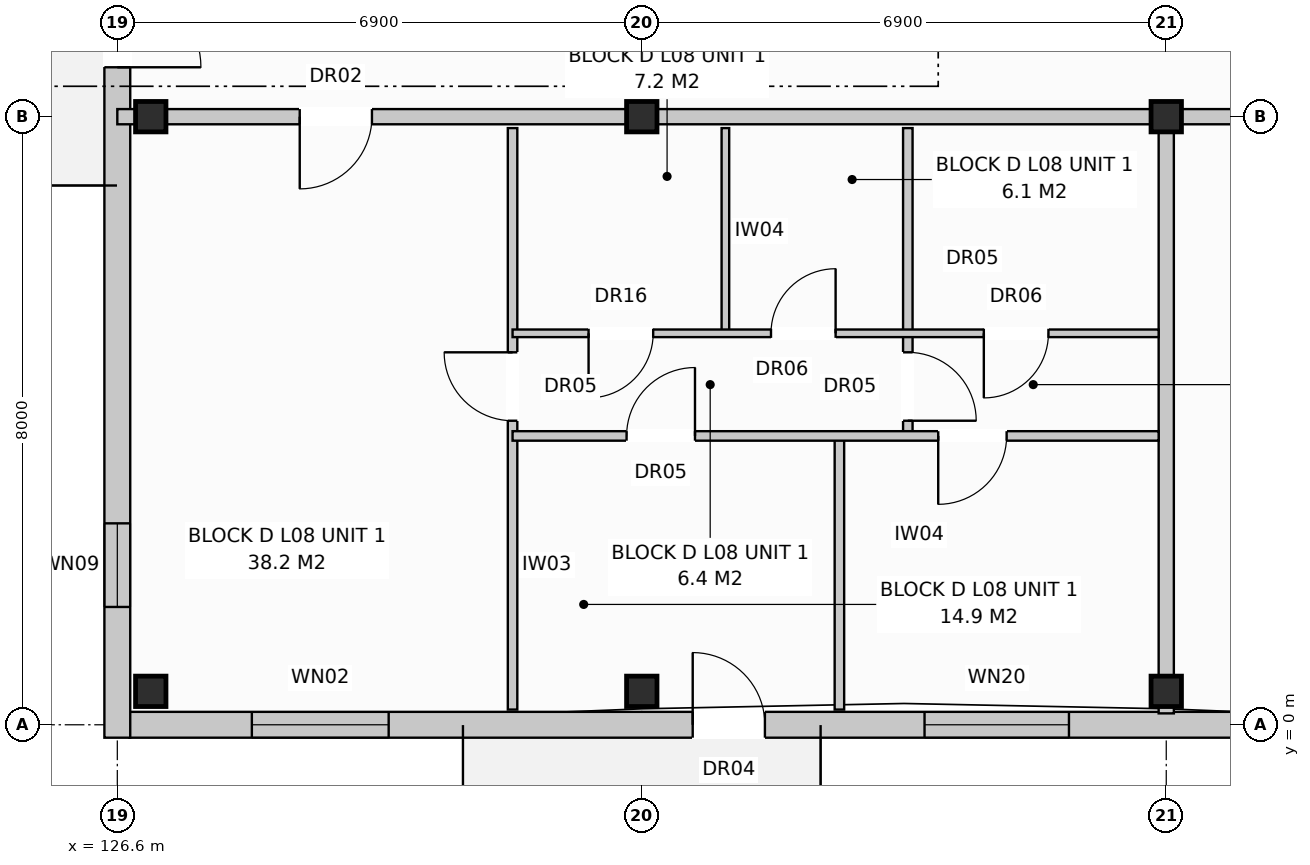
"""IFC4 building model, lengths in metres.
Left out: names, types, materials, properties, quantities, classifications, styles, units other than length and angle.
Written with IfcOpenShell. Run it as: python <this file> out.ifc"""

import sys

from ifc_helpers import new_model, si_unit, direction, frame, frame_2d, origin, origin_with_axes, origin_2d, place, context, subcontext, project, spatial, rectangle, extrude, element, fill, save


model = new_model("IFC4")
c1 = context("Model", 3, precision=1e-05, world=origin(), true_north=direction((0.0, 1.0)))
c2 = subcontext(c1, "Body", "Model", "MODEL_VIEW")
j1 = project(units=[si_unit("LENGTHUNIT", "METRE"), si_unit("PLANEANGLEUNIT", "RADIAN")], contexts=[c1])
p1 = place(None, origin())
s1 = spatial("IfcSite", under=j1, at=p1, CompositionType="ELEMENT")
p2 = place(p1, origin())
s2 = spatial("IfcBuilding", under=s1, at=p2, CompositionType="ELEMENT")
p3 = place(p2, frame((0.0, 0.0, 27.2)))
s3 = spatial("IfcBuildingStorey", under=s2, at=p3, CompositionType="ELEMENT", Elevation=27.2)
for number, where, z_axis, x_axis in (
    (1, (127.04, 0.44, 0.0), (0.0, 0.0, 1.0), (1.0, 0.0, 0.0)),
    (2, (127.04, 8.0, 0.0), (0.0, 0.0, 1.0), (1.0, 0.0, 0.0)),
    (3, (133.5, 0.44, 0.0), (0.0, 0.0, 1.0), (1.0, 0.0, 0.0)),
    (4, (133.5, 8.0, 0.0), (0.0, 0.0, 1.0), (1.0, 0.0, 0.0)),
    (5, (140.4, 0.44, 0.0), (0.0, 0.0, 1.0), (1.0, 0.0, 0.0)),
    (6, (140.4, 8.0, 0.0), (0.0, 0.0, 1.0), (1.0, 0.0, 0.0)),
):
    element("IfcColumn", number, at=place(p3, frame(where, z_axis=z_axis, x_axis=x_axis)), inside=s3, PredefinedType="COLUMN", context=c2, shape_type="SweptSolid", body=[
        extrude(rectangle(XDim=0.4, YDim=0.4, at=origin_2d()), origin(), (0.0, 0.0, 1.0), 3.2),
    ])
p4 = place(p3, frame((126.76, 0.0, 0.0), z_axis=(0.0, 0.0, 1.0), x_axis=(1.0, 0.0, 0.0)))
e7 = element("IfcWall", 7, at=p4, inside=s3, PredefinedType="STANDARD", context=c2, shape_type="SweptSolid", body=[
    extrude(rectangle(XDim=41.08, YDim=0.34, at=frame_2d((20.54, 0.0))), origin(), (0.0, 0.0, 1.0), 2.91),
])
p5 = place(p4, frame((7.41, 0.0, 0.0)))
e8 = element("IfcOpeningElement", 8, at=p5, cuts=e7, PredefinedType="OPENING", context=c2, shape_type="SweptSolid", body=[
    extrude(rectangle(XDim=0.95, YDim=2.1, at=frame_2d((0.475, 1.05))), frame((0.0, 0.182, 0.0), z_axis=(0.0, -1.0, 0.0), x_axis=(1.0, 0.0, 0.0)), (0.0, 0.0, 1.0), 0.364),
])
p6 = place(p4, frame((18.707, 0.0, 0.0)))
e9 = element("IfcOpeningElement", 9, at=p6, cuts=e7, PredefinedType="OPENING", context=c2, shape_type="SweptSolid", body=[
    extrude(rectangle(XDim=0.95, YDim=2.1, at=frame_2d((0.475, 1.05))), frame((0.0, 0.182, 0.0), z_axis=(0.0, -1.0, 0.0), x_axis=(1.0, 0.0, 0.0)), (0.0, 0.0, 1.0), 0.364),
])
p7 = place(p4, frame((32.707, 0.0, 0.0)))
e10 = element("IfcOpeningElement", 10, at=p7, cuts=e7, PredefinedType="OPENING", context=c2, shape_type="SweptSolid", body=[
    extrude(rectangle(XDim=0.95, YDim=2.1, at=frame_2d((0.475, 1.05))), frame((0.0, 0.182, 0.0), z_axis=(0.0, -1.0, 0.0), x_axis=(1.0, 0.0, 0.0)), (0.0, 0.0, 1.0), 0.364),
])
p8 = place(p4, frame((1.61, 0.0, 0.8)))
e11 = element("IfcOpeningElement", 11, at=p8, cuts=e7, PredefinedType="OPENING", context=c2, shape_type="SweptSolid", body=[
    extrude(rectangle(XDim=1.8, YDim=1.7, at=frame_2d((0.9, 0.85))), frame((0.0, 0.182, 0.0), z_axis=(0.0, -1.0, 0.0), x_axis=(1.0, 0.0, 0.0)), (0.0, 0.0, 1.0), 0.364),
])
p9 = place(p4, frame((10.46, 0.0, 0.8)))
e12 = element("IfcOpeningElement", 12, at=p9, cuts=e7, PredefinedType="OPENING", context=c2, shape_type="SweptSolid", body=[
    extrude(rectangle(XDim=1.9, YDim=1.85, at=frame_2d((0.95, 0.925))), frame((0.0, 0.182, 0.0), z_axis=(0.0, -1.0, 0.0), x_axis=(1.0, 0.0, 0.0)), (0.0, 0.0, 1.0), 0.364),
])
p10 = place(p4, frame((15.835, 0.0, 0.8)))
e13 = element("IfcOpeningElement", 13, at=p10, cuts=e7, PredefinedType="OPENING", context=c2, shape_type="SweptSolid", body=[
    extrude(rectangle(XDim=1.95, YDim=1.65, at=frame_2d((0.975, 0.825))), frame((0.0, 0.182, 0.0), z_axis=(0.0, -1.0, 0.0), x_axis=(1.0, 0.0, 0.0)), (0.0, 0.0, 1.0), 0.364),
])
p11 = place(p4, frame((21.96, 0.0, 0.72)))
e14 = element("IfcOpeningElement", 14, at=p11, cuts=e7, PredefinedType="OPENING", context=c2, shape_type="SweptSolid", body=[
    extrude(rectangle(XDim=1.1, YDim=1.5, at=frame_2d((0.55, 0.75))), frame((0.0, 0.182, 0.0), z_axis=(0.0, -1.0, 0.0), x_axis=(1.0, 0.0, 0.0)), (0.0, 0.0, 1.0), 0.364),
])
p12 = place(p4, frame((27.96, 0.0, 0.8)))
e15 = element("IfcOpeningElement", 15, at=p12, cuts=e7, PredefinedType="OPENING", context=c2, shape_type="SweptSolid", body=[
    extrude(rectangle(XDim=1.9, YDim=1.85, at=frame_2d((0.95, 0.925))), frame((0.0, 0.182, 0.0), z_axis=(0.0, -1.0, 0.0), x_axis=(1.0, 0.0, 0.0)), (0.0, 0.0, 1.0), 0.364),
])
p13 = place(p4, frame((30.81, 0.0, 0.85)))
e16 = element("IfcOpeningElement", 16, at=p13, cuts=e7, PredefinedType="OPENING", context=c2, shape_type="SweptSolid", body=[
    extrude(rectangle(XDim=1.5, YDim=1.65, at=frame_2d((0.75, 0.825))), frame((0.0, 0.182, 0.0), z_axis=(0.0, -1.0, 0.0), x_axis=(1.0, 0.0, 0.0)), (0.0, 0.0, 1.0), 0.364),
])
p14 = place(p4, frame((35.76, 0.0, 0.72)))
e17 = element("IfcOpeningElement", 17, at=p14, cuts=e7, PredefinedType="OPENING", context=c2, shape_type="SweptSolid", body=[
    extrude(rectangle(XDim=1.1, YDim=1.5, at=frame_2d((0.55, 0.75))), frame((0.0, 0.182, 0.0), z_axis=(0.0, -1.0, 0.0), x_axis=(1.0, 0.0, 0.0)), (0.0, 0.0, 1.0), 0.364),
])
p15 = place(p4, frame((38.575, 0.0, 0.8)))
e18 = element("IfcOpeningElement", 18, at=p15, cuts=e7, PredefinedType="OPENING", context=c2, shape_type="SweptSolid", body=[
    extrude(rectangle(XDim=1.9, YDim=1.85, at=frame_2d((0.95, 0.925))), frame((0.0, 0.182, 0.0), z_axis=(0.0, -1.0, 0.0), x_axis=(1.0, 0.0, 0.0)), (0.0, 0.0, 1.0), 0.364),
])
p16 = place(p3, frame((126.6, -0.17, 0.0), z_axis=(0.0, 0.0, 1.0), x_axis=(0.0, 1.0, 0.0)))
e19 = element("IfcWall", 19, at=p16, inside=s3, PredefinedType="STANDARD", context=c2, shape_type="SweptSolid", body=[
    extrude(rectangle(XDim=18.74, YDim=0.34, at=frame_2d((9.37, 0.0))), origin(), (0.0, 0.0, 1.0), 2.91),
])
p17 = place(p16, frame((8.82, 0.0, 0.0)))
e20 = element("IfcOpeningElement", 20, at=p17, cuts=e19, PredefinedType="OPENING", context=c2, shape_type="SweptSolid", body=[
    extrude(rectangle(XDim=1.1, YDim=2.1, at=frame_2d((0.55, 1.05))), frame((0.0, 0.182, 0.0), z_axis=(0.0, -1.0, 0.0), x_axis=(1.0, 0.0, 0.0)), (0.0, 0.0, 1.0), 0.364),
])
p18 = place(p16, frame((1.72, 0.0, 0.72)))
e21 = element("IfcOpeningElement", 21, at=p18, cuts=e19, PredefinedType="OPENING", context=c2, shape_type="SweptSolid", body=[
    extrude(rectangle(XDim=1.1, YDim=1.5, at=frame_2d((0.55, 0.75))), frame((0.0, 0.182, 0.0), z_axis=(0.0, -1.0, 0.0), x_axis=(1.0, 0.0, 0.0)), (0.0, 0.0, 1.0), 0.364),
])
p19 = place(p3, frame((140.4, 7.85, 0.0), z_axis=(0.0, 0.0, 1.0), x_axis=(0.0, -1.0, 0.0)))
e22 = element("IfcWall", 22, at=p19, inside=s3, PredefinedType="PARTITIONING", context=c2, shape_type="SweptSolid", body=[
    extrude(rectangle(XDim=7.7, YDim=0.2, at=frame_2d((3.85, 0.0))), origin(), (0.0, 0.0, 1.0), 2.96),
])
p20 = place(p3, frame((126.6, 8.0, 0.0), z_axis=(0.0, 0.0, 1.0), x_axis=(1.0, 0.0, 0.0)))
e23 = element("IfcWall", 23, at=p20, inside=s3, PredefinedType="PARTITIONING", context=c2, shape_type="SweptSolid", body=[
    extrude(rectangle(XDim=13.8, YDim=0.2, at=frame_2d((6.9, 0.0))), origin(), (0.0, 0.0, 1.0), 2.35),
])
p21 = place(p20, frame((2.4, 0.0, 0.0)))
e24 = element("IfcOpeningElement", 24, at=p21, cuts=e23, PredefinedType="OPENING", context=c2, shape_type="SweptSolid", body=[
    extrude(rectangle(XDim=0.95, YDim=2.15, at=frame_2d((0.475, 1.075))), frame((0.0, 0.112, 0.0), z_axis=(0.0, -1.0, 0.0), x_axis=(1.0, 0.0, 0.0)), (0.0, 0.0, 1.0), 0.224),
])
p22 = place(p3, frame((131.8, 7.85, 0.0), z_axis=(0.0, 0.0, 1.0), x_axis=(0.0, -1.0, 0.0)))
e25 = element("IfcWall", 25, at=p22, inside=s3, PredefinedType="PARTITIONING", context=c2, shape_type="SweptSolid", body=[
    extrude(rectangle(XDim=7.65, YDim=0.125, at=frame_2d((3.825, 0.0))), origin(), (0.0, 0.0, 1.0), 2.96),
])
p23 = place(p22, frame((2.95, 0.0, 0.0)))
e26 = element("IfcOpeningElement", 26, at=p23, cuts=e25, PredefinedType="OPENING", context=c2, shape_type="SweptSolid", body=[
    extrude(rectangle(XDim=0.9, YDim=2.1, at=frame_2d((0.45, 1.05))), frame((0.0, 0.074, 0.0), z_axis=(0.0, -1.0, 0.0), x_axis=(1.0, 0.0, 0.0)), (0.0, 0.0, 1.0), 0.149),
])
p24 = place(p3, frame((134.6, 7.85, 0.0), z_axis=(0.0, 0.0, 1.0), x_axis=(0.0, -1.0, 0.0)))
e27 = element("IfcWall", 27, at=p24, inside=s3, PredefinedType="PARTITIONING", context=c2, shape_type="SweptSolid", body=[
    extrude(rectangle(XDim=2.7, YDim=0.1, at=frame_2d((1.35, 0.0))), origin(), (0.0, 0.0, 1.0), 2.59),
])
p25 = place(p3, frame((137.0, 7.85, 0.0), z_axis=(0.0, 0.0, 1.0), x_axis=(0.0, -1.0, 0.0)))
e28 = element("IfcWall", 28, at=p25, inside=s3, PredefinedType="PARTITIONING", context=c2, shape_type="SweptSolid", body=[
    extrude(rectangle(XDim=4.05, YDim=0.125, at=frame_2d((2.025, 0.0))), origin(), (0.0, 0.0, 1.0), 2.96),
])
p26 = place(p25, frame((2.95, 0.0, 0.0)))
e29 = element("IfcOpeningElement", 29, at=p26, cuts=e28, PredefinedType="OPENING", context=c2, shape_type="SweptSolid", body=[
    extrude(rectangle(XDim=0.9, YDim=2.1, at=frame_2d((0.45, 1.05))), frame((0.0, 0.074, 0.0), z_axis=(0.0, -1.0, 0.0), x_axis=(1.0, 0.0, 0.0)), (0.0, 0.0, 1.0), 0.149),
])
p27 = place(p3, frame((136.1, 3.8, 0.0), z_axis=(0.0, 0.0, 1.0), x_axis=(0.0, -1.0, 0.0)))
e30 = element("IfcWall", 30, at=p27, inside=s3, PredefinedType="PARTITIONING", context=c2, shape_type="SweptSolid", body=[
    extrude(rectangle(XDim=3.6, YDim=0.125, at=frame_2d((1.8, 0.0))), origin(), (0.0, 0.0, 1.0), 2.96),
])
p28 = place(p3, frame((131.8, 5.15, 0.0), z_axis=(0.0, 0.0, 1.0), x_axis=(1.0, 0.0, 0.0)))
e31 = element("IfcWall", 31, at=p28, inside=s3, PredefinedType="PARTITIONING", context=c2, shape_type="SweptSolid", body=[
    extrude(rectangle(XDim=8.5, YDim=0.1, at=frame_2d((4.25, 0.0))), origin(), (0.0, 0.0, 1.0), 2.96),
])
p29 = place(p28, frame((1.0, 0.0, 0.0)))
e32 = element("IfcOpeningElement", 32, at=p29, cuts=e31, PredefinedType="OPENING", context=c2, shape_type="SweptSolid", body=[
    extrude(rectangle(XDim=0.85, YDim=2.1, at=frame_2d((0.425, 1.05))), frame((0.0, 0.062, 0.0), z_axis=(0.0, -1.0, 0.0), x_axis=(1.0, 0.0, 0.0)), (0.0, 0.0, 1.0), 0.124),
])
p30 = place(p28, frame((3.4, 0.0, 0.0)))
e33 = element("IfcOpeningElement", 33, at=p30, cuts=e31, PredefinedType="OPENING", context=c2, shape_type="SweptSolid", body=[
    extrude(rectangle(XDim=0.85, YDim=2.05, at=frame_2d((0.425, 1.025))), frame((0.0, 0.062, 0.0), z_axis=(0.0, -1.0, 0.0), x_axis=(1.0, 0.0, 0.0)), (0.0, 0.0, 1.0), 0.124),
])
p31 = place(p28, frame((6.2, 0.0, 0.0)))
e34 = element("IfcOpeningElement", 34, at=p31, cuts=e31, PredefinedType="OPENING", context=c2, shape_type="SweptSolid", body=[
    extrude(rectangle(XDim=0.85, YDim=2.05, at=frame_2d((0.425, 1.025))), frame((0.0, 0.062, 0.0), z_axis=(0.0, -1.0, 0.0), x_axis=(1.0, 0.0, 0.0)), (0.0, 0.0, 1.0), 0.124),
])
p32 = place(p3, frame((131.8, 3.8, 0.0), z_axis=(0.0, 0.0, 1.0), x_axis=(1.0, 0.0, 0.0)))
e35 = element("IfcWall", 35, at=p32, inside=s3, PredefinedType="PARTITIONING", context=c2, shape_type="SweptSolid", body=[
    extrude(rectangle(XDim=8.5, YDim=0.125, at=frame_2d((4.25, 0.0))), origin(), (0.0, 0.0, 1.0), 2.96),
])
p33 = place(p32, frame((1.5, 0.0, 0.0)))
e36 = element("IfcOpeningElement", 36, at=p33, cuts=e35, PredefinedType="OPENING", context=c2, shape_type="SweptSolid", body=[
    extrude(rectangle(XDim=0.9, YDim=2.1, at=frame_2d((0.45, 1.05))), frame((0.0, 0.074, 0.0), z_axis=(0.0, -1.0, 0.0), x_axis=(1.0, 0.0, 0.0)), (0.0, 0.0, 1.0), 0.149),
])
p34 = place(p32, frame((5.6, 0.0, 0.0)))
e37 = element("IfcOpeningElement", 37, at=p34, cuts=e35, PredefinedType="OPENING", context=c2, shape_type="SweptSolid", body=[
    extrude(rectangle(XDim=0.9, YDim=2.1, at=frame_2d((0.45, 1.05))), frame((0.0, 0.074, 0.0), z_axis=(0.0, -1.0, 0.0), x_axis=(1.0, 0.0, 0.0)), (0.0, 0.0, 1.0), 0.149),
])
p35 = place(p3, frame((140.4, 8.0, 0.0), z_axis=(0.0, 0.0, 1.0), x_axis=(1.0, 0.0, 0.0)))
e38 = element("IfcWall", 38, at=p35, inside=s3, PredefinedType="PARTITIONING", context=c2, shape_type="SweptSolid", body=[
    extrude(rectangle(XDim=20.7, YDim=0.2, at=frame_2d((10.35, 0.0))), origin(), (0.0, 0.0, 1.0), 2.35),
])
p36 = place(p35, frame((2.4, 0.0, 0.0)))
e39 = element("IfcOpeningElement", 39, at=p36, cuts=e38, PredefinedType="OPENING", context=c2, shape_type="SweptSolid", body=[
    extrude(rectangle(XDim=0.95, YDim=2.15, at=frame_2d((0.475, 1.075))), frame((0.0, 0.112, 0.0), z_axis=(0.0, -1.0, 0.0), x_axis=(1.0, 0.0, 0.0)), (0.0, 0.0, 1.0), 0.224),
])
p37 = place(p5, origin_with_axes())
e40 = element("IfcDoor", 40, at=p37, inside=s3, OperationType="SINGLE_SWING_LEFT", PredefinedType="DOOR", context=c2, shape_type="SweptSolid", body=[
    extrude(rectangle(XDim=0.95, YDim=2.1, at=frame_2d((0.475, 1.05))), frame((0.0, 0.025, 0.0), z_axis=(0.0, -1.0, 0.0), x_axis=(1.0, 0.0, 0.0)), (0.0, 0.0, 1.0), 0.05),
])
fill(e8, e40)
p38 = place(p8, origin_with_axes())
e41 = element("IfcWindow", 41, at=p38, inside=s3, PartitioningType="SINGLE_PANEL", PredefinedType="WINDOW", context=c2, shape_type="SweptSolid", body=[
    extrude(rectangle(XDim=1.8, YDim=1.7, at=frame_2d((0.9, 0.85))), frame((0.0, 0.03, 0.0), z_axis=(0.0, -1.0, 0.0), x_axis=(1.0, 0.0, 0.0)), (0.0, 0.0, 1.0), 0.06),
])
fill(e11, e41)
p39 = place(p9, origin_with_axes())
e42 = element("IfcWindow", 42, at=p39, inside=s3, PartitioningType="SINGLE_PANEL", PredefinedType="WINDOW", context=c2, shape_type="SweptSolid", body=[
    extrude(rectangle(XDim=1.9, YDim=1.85, at=frame_2d((0.95, 0.925))), frame((0.0, 0.03, 0.0), z_axis=(0.0, -1.0, 0.0), x_axis=(1.0, 0.0, 0.0)), (0.0, 0.0, 1.0), 0.06),
])
fill(e12, e42)
p40 = place(p17, frame((1.1, 0.0, 0.0), z_axis=(0.0, 0.0, 1.0), x_axis=(-1.0, 0.0, 0.0)))
e43 = element("IfcDoor", 43, at=p40, inside=s3, OperationType="SINGLE_SWING_LEFT", PredefinedType="DOOR", context=c2, shape_type="SweptSolid", body=[
    extrude(rectangle(XDim=1.1, YDim=2.1, at=frame_2d((0.55, 1.05))), frame((0.0, 0.025, 0.0), z_axis=(0.0, -1.0, 0.0), x_axis=(1.0, 0.0, 0.0)), (0.0, 0.0, 1.0), 0.05),
])
fill(e20, e43)
p41 = place(p18, origin_with_axes())
e44 = element("IfcWindow", 44, at=p41, inside=s3, PartitioningType="SINGLE_PANEL", PredefinedType="WINDOW", context=c2, shape_type="SweptSolid", body=[
    extrude(rectangle(XDim=1.1, YDim=1.5, at=frame_2d((0.55, 0.75))), frame((0.0, 0.03, 0.0), z_axis=(0.0, -1.0, 0.0), x_axis=(1.0, 0.0, 0.0)), (0.0, 0.0, 1.0), 0.06),
])
fill(e21, e44)
p42 = place(p21, frame((0.95, 0.0, 0.0), z_axis=(0.0, 0.0, 1.0), x_axis=(-1.0, 0.0, 0.0)))
e45 = element("IfcDoor", 45, at=p42, inside=s3, OperationType="SINGLE_SWING_LEFT", PredefinedType="DOOR", context=c2, shape_type="SweptSolid", body=[
    extrude(rectangle(XDim=0.95, YDim=2.15, at=frame_2d((0.475, 1.075))), frame((0.0, 0.025, 0.0), z_axis=(0.0, -1.0, 0.0), x_axis=(1.0, 0.0, 0.0)), (0.0, 0.0, 1.0), 0.05),
])
fill(e24, e45)
p43 = place(p23, frame((0.9, 0.0, 0.0), z_axis=(0.0, 0.0, 1.0), x_axis=(-1.0, 0.0, 0.0)))
e46 = element("IfcDoor", 46, at=p43, inside=s3, OperationType="SINGLE_SWING_LEFT", PredefinedType="DOOR", context=c2, shape_type="SweptSolid", body=[
    extrude(rectangle(XDim=0.9, YDim=2.1, at=frame_2d((0.45, 1.05))), frame((0.0, 0.025, 0.0), z_axis=(0.0, -1.0, 0.0), x_axis=(1.0, 0.0, 0.0)), (0.0, 0.0, 1.0), 0.05),
])
fill(e26, e46)
p44 = place(p26, origin_with_axes())
e47 = element("IfcDoor", 47, at=p44, inside=s3, OperationType="SINGLE_SWING_RIGHT", PredefinedType="DOOR", context=c2, shape_type="SweptSolid", body=[
    extrude(rectangle(XDim=0.9, YDim=2.1, at=frame_2d((0.45, 1.05))), frame((0.0, 0.025, 0.0), z_axis=(0.0, -1.0, 0.0), x_axis=(1.0, 0.0, 0.0)), (0.0, 0.0, 1.0), 0.05),
])
fill(e29, e47)
p45 = place(p29, frame((0.85, 0.0, 0.0), z_axis=(0.0, 0.0, 1.0), x_axis=(-1.0, 0.0, 0.0)))
e48 = element("IfcDoor", 48, at=p45, inside=s3, OperationType="SINGLE_SWING_LEFT", PredefinedType="DOOR", context=c2, shape_type="SweptSolid", body=[
    extrude(rectangle(XDim=0.85, YDim=2.1, at=frame_2d((0.425, 1.05))), frame((0.0, 0.025, 0.0), z_axis=(0.0, -1.0, 0.0), x_axis=(1.0, 0.0, 0.0)), (0.0, 0.0, 1.0), 0.05),
])
fill(e32, e48)
p46 = place(p30, origin_with_axes())
e49 = element("IfcDoor", 49, at=p46, inside=s3, OperationType="SINGLE_SWING_RIGHT", PredefinedType="DOOR", context=c2, shape_type="SweptSolid", body=[
    extrude(rectangle(XDim=0.85, YDim=2.05, at=frame_2d((0.425, 1.025))), frame((0.0, 0.025, 0.0), z_axis=(0.0, -1.0, 0.0), x_axis=(1.0, 0.0, 0.0)), (0.0, 0.0, 1.0), 0.05),
])
fill(e33, e49)
p47 = place(p31, frame((0.85, 0.0, 0.0), z_axis=(0.0, 0.0, 1.0), x_axis=(-1.0, 0.0, 0.0)))
e50 = element("IfcDoor", 50, at=p47, inside=s3, OperationType="SINGLE_SWING_LEFT", PredefinedType="DOOR", context=c2, shape_type="SweptSolid", body=[
    extrude(rectangle(XDim=0.85, YDim=2.05, at=frame_2d((0.425, 1.025))), frame((0.0, 0.025, 0.0), z_axis=(0.0, -1.0, 0.0), x_axis=(1.0, 0.0, 0.0)), (0.0, 0.0, 1.0), 0.05),
])
fill(e34, e50)
p48 = place(p33, origin_with_axes())
e51 = element("IfcDoor", 51, at=p48, inside=s3, OperationType="SINGLE_SWING_RIGHT", PredefinedType="DOOR", context=c2, shape_type="SweptSolid", body=[
    extrude(rectangle(XDim=0.9, YDim=2.1, at=frame_2d((0.45, 1.05))), frame((0.0, 0.025, 0.0), z_axis=(0.0, -1.0, 0.0), x_axis=(1.0, 0.0, 0.0)), (0.0, 0.0, 1.0), 0.05),
])
fill(e36, e51)
p49 = place(p34, frame((0.9, 0.0, 0.0), z_axis=(0.0, 0.0, 1.0), x_axis=(-1.0, 0.0, 0.0)))
e52 = element("IfcDoor", 52, at=p49, inside=s3, OperationType="SINGLE_SWING_LEFT", PredefinedType="DOOR", context=c2, shape_type="SweptSolid", body=[
    extrude(rectangle(XDim=0.9, YDim=2.1, at=frame_2d((0.45, 1.05))), frame((0.0, 0.025, 0.0), z_axis=(0.0, -1.0, 0.0), x_axis=(1.0, 0.0, 0.0)), (0.0, 0.0, 1.0), 0.05),
])
fill(e37, e52)
save(model, sys.argv[1])
